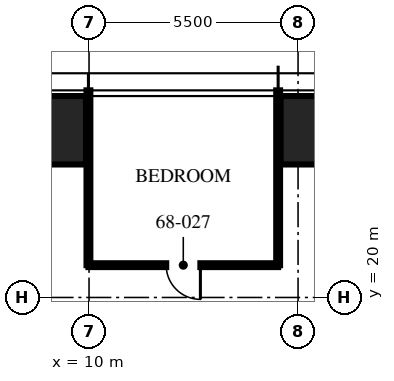
"""IFC4 building model, lengths in metres.
Left out: names, types, materials, properties, quantities, classifications, styles, units other than length and angle.
Written with IfcOpenShell. Run it as: python <this file> out.ifc"""

import sys

from ifc_helpers import new_model, si_unit, direction, frame, frame_2d, origin, origin_2d, place, context, subcontext, project, spatial, rectangle, hollow_rectangle, extrude, element, fill, save


model = new_model("IFC4")
c1 = context("Model", 3, precision=1e-05, world=origin(), true_north=direction((0.0, 1.0)))
c2 = subcontext(c1, "Body", "Model", "MODEL_VIEW")
j1 = project(units=[si_unit("LENGTHUNIT", "METRE"), si_unit("PLANEANGLEUNIT", "RADIAN")], contexts=[c1])
p1 = place(None, origin())
s1 = spatial("IfcSite", under=j1, at=p1, CompositionType="ELEMENT")
p2 = place(p1, origin())
s2 = spatial("IfcBuilding", under=s1, at=p2, CompositionType="ELEMENT")
p3 = place(p2, frame((0.0, 0.0, 270.75)))
s3 = spatial("IfcBuildingStorey", under=s2, at=p3, CompositionType="ELEMENT", Elevation=270.75)
for number, where, z_axis, x_axis in (
    (1, (8.32, 24.4, 0.0), (0.0, 0.0, 1.0), (1.0, 0.0, 0.0)),
    (2, (16.64, 24.4, 0.0), (0.0, 0.0, 1.0), (1.0, 0.0, 0.0)),
):
    element("IfcColumn", number, at=place(p3, frame(where, z_axis=z_axis, x_axis=x_axis)), inside=s3, PredefinedType="COLUMN", context=c2, shape_type="SweptSolid", body=[
        extrude(hollow_rectangle(XDim=3.2, YDim=1.8, WallThickness=0.14, at=origin_2d()), origin(), (0.0, 0.0, 1.0), 3.75),
    ])
for number, where, z_axis, x_axis in (
    (3, (14.976, 20.85, 0.0), (0.0, 0.0, 1.0), (0.0, 1.0, 0.0)),
    (4, (9.984, 20.85, 0.0), (0.0, 0.0, 1.0), (0.0, 1.0, 0.0)),
):
    element("IfcWall", number, at=place(p3, frame(where, z_axis=z_axis, x_axis=x_axis)), inside=s3, PredefinedType="PARTITIONING", context=c2, shape_type="SweptSolid", body=[
        extrude(rectangle(XDim=4.6, YDim=0.1, at=frame_2d((2.3, 0.0))), origin(), (0.0, 0.0, 1.0), 2.81),
    ])
p4 = place(p3, frame((14.976, 20.85, 0.0), z_axis=(0.0, 0.0, 1.0), x_axis=(-1.0, 0.0, 0.0)))
e5 = element("IfcWall", 5, at=p4, inside=s3, PredefinedType="PARTITIONING", context=c2, shape_type="SweptSolid", body=[
    extrude(rectangle(XDim=4.992, YDim=0.1, at=frame_2d((2.496, 0.0))), origin(), (0.0, 0.0, 1.0), 2.71),
])
p5 = place(p4, frame((2.046, 0.0, 0.0)))
e6 = element("IfcOpeningElement", 6, at=p5, cuts=e5, PredefinedType="OPENING", context=c2, shape_type="SweptSolid", body=[
    extrude(rectangle(XDim=0.9, YDim=2.1, at=frame_2d((0.45, 1.05))), frame((0.0, 0.06, 0.0), z_axis=(0.0, -1.0, 0.0), x_axis=(1.0, 0.0, 0.0)), (0.0, 0.0, 1.0), 0.12),
])
p6 = place(p5, origin())
e7 = element("IfcDoor", 7, at=p6, inside=s3, OperationType="SINGLE_SWING_LEFT", PredefinedType="DOOR", context=c2, shape_type="SweptSolid", body=[
    extrude(rectangle(XDim=0.9, YDim=2.1, at=frame_2d((0.45, 1.05))), frame((0.0, 0.025, 0.0), z_axis=(0.0, -1.0, 0.0), x_axis=(1.0, 0.0, 0.0)), (0.0, 0.0, 1.0), 0.05),
])
fill(e6, e7)
save(model, sys.argv[1])
